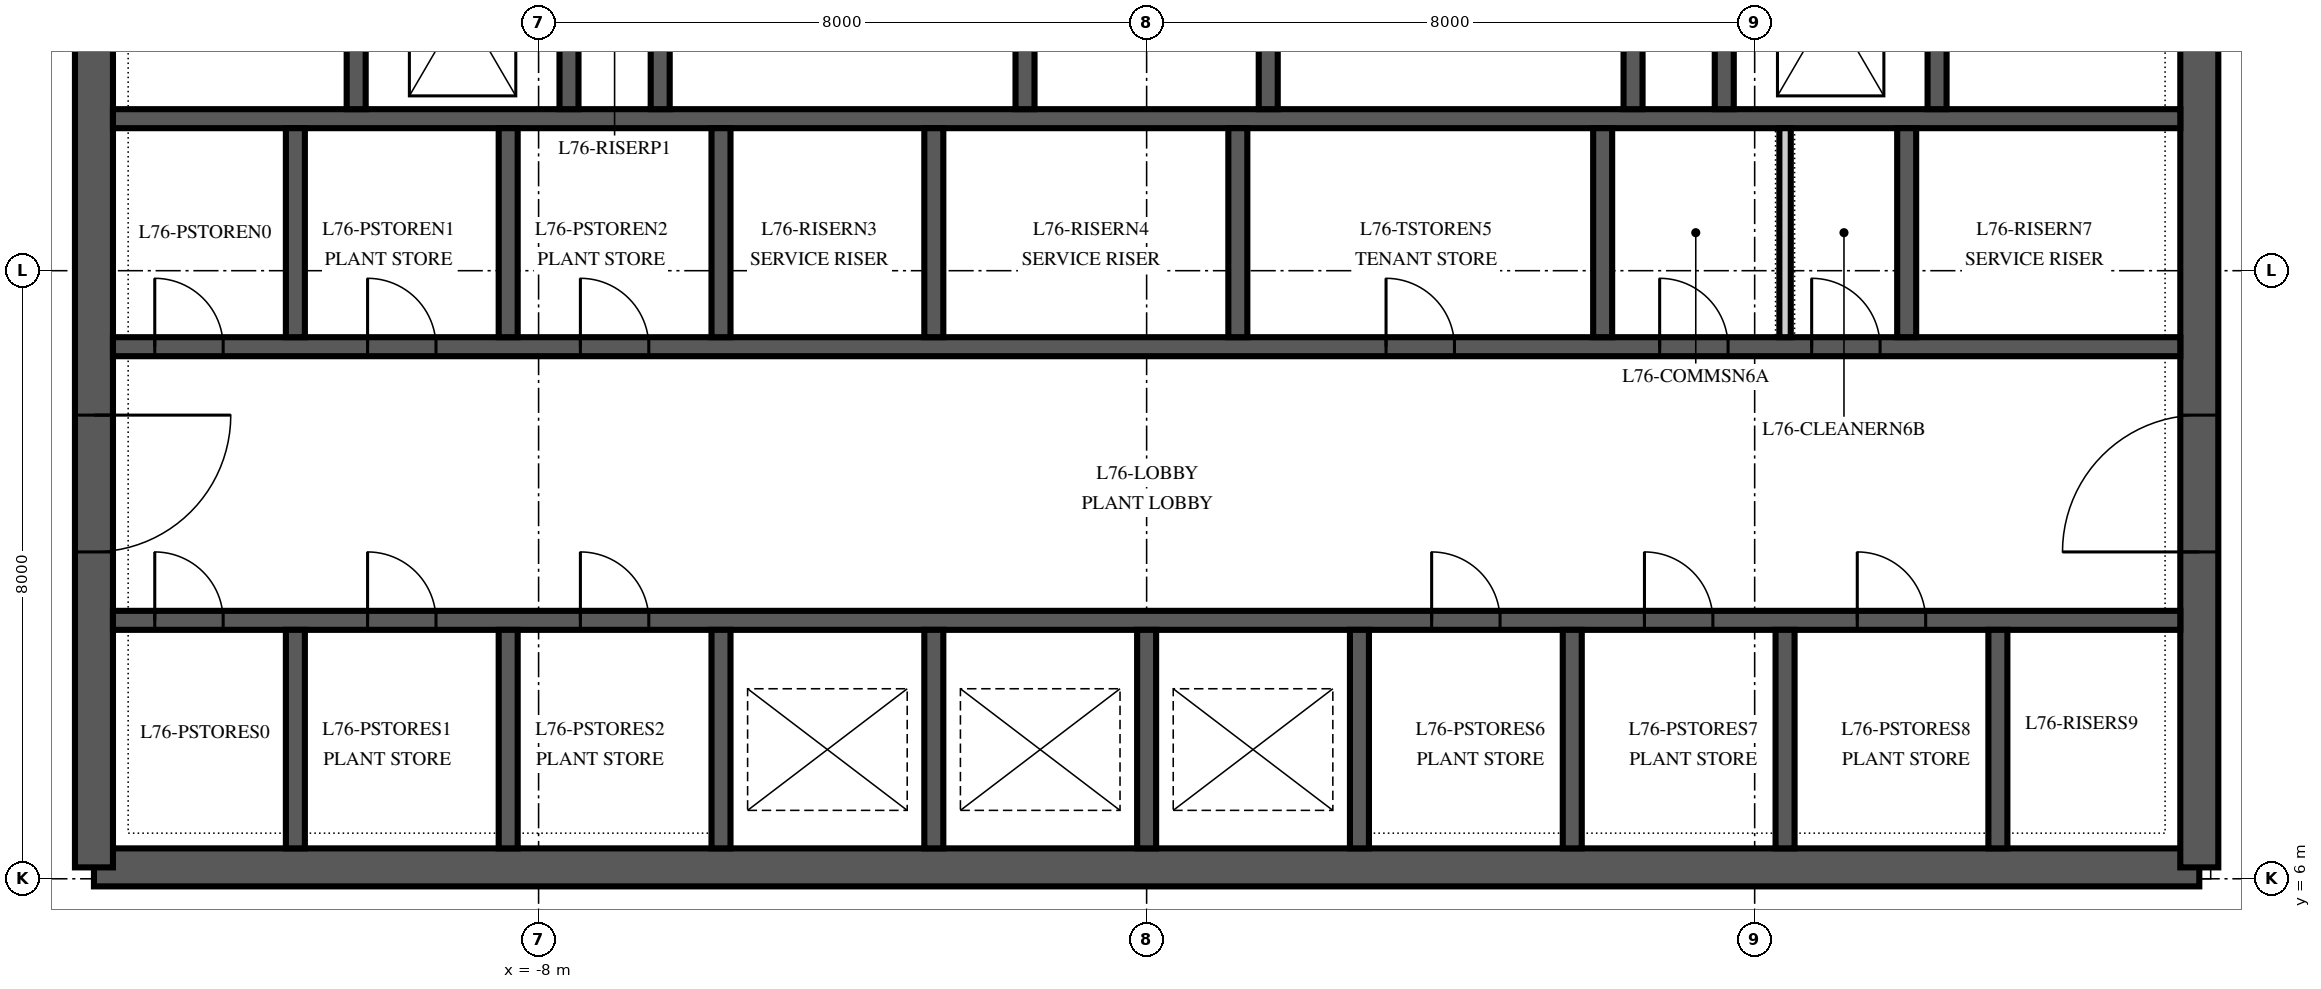
"""IFC4 building model, lengths in metres.
Left out: names, types, materials, properties, quantities, classifications, styles, units other than length and angle.
Written with IfcOpenShell. Run it as: python <this file> out.ifc"""

import sys

from ifc_helpers import new_model, si_unit, direction, frame, frame_2d, origin, place, context, subcontext, project, spatial, polyline, rectangle, outline, extrude, element, fill, save


model = new_model("IFC4")
c1 = context("Model", 3, precision=1e-05, world=origin(), true_north=direction((0.0, 1.0)))
c2 = subcontext(c1, "Body", "Model", "MODEL_VIEW")
j1 = project(units=[si_unit("LENGTHUNIT", "METRE"), si_unit("PLANEANGLEUNIT", "RADIAN")], contexts=[c1])
p1 = place(None, origin())
s1 = spatial("IfcSite", under=j1, at=p1, CompositionType="ELEMENT")
p2 = place(p1, origin())
s2 = spatial("IfcBuilding", under=s1, at=p2, CompositionType="ELEMENT")
p3 = place(p2, frame((0.0, 0.0, 324.0)))
s3 = spatial("IfcBuildingStorey", under=s2, at=p3, CompositionType="ELEMENT", Elevation=324.0)
p4 = place(p3, frame((-13.85, 6.15, 0.0), z_axis=(0.0, 0.0, 1.0), x_axis=(1.0, 0.0, 0.0)))
e1 = element("IfcWall", 1, at=p4, inside=s3, PredefinedType="SHEAR", context=c2, shape_type="SweptSolid", body=[
    extrude(rectangle(XDim=27.7, YDim=0.5, at=frame_2d((13.85, 0.0))), origin(), (0.0, 0.0, 1.0), 6.0),
])
p5 = place(p3, frame((13.85, 6.15, 0.0), z_axis=(0.0, 0.0, 1.0), x_axis=(0.0, 1.0, 0.0)))
e2 = element("IfcWall", 2, at=p5, inside=s3, PredefinedType="SHEAR", context=c2, shape_type="SweptSolid", body=[
    extrude(outline(polyline([(0.0, -0.25), (17.7, -0.25), (17.7, 0.0), (17.45, 0.0), (17.45, 0.25), (0.25, 0.25), (0.25, 0.0), (0.0, 0.0), (0.0, -0.25)])), origin(), (0.0, 0.0, 1.0), 6.0),
])
p6 = place(p5, frame((4.15, 0.0, 0.0)))
e3 = element("IfcOpeningElement", 3, at=p6, cuts=e2, PredefinedType="OPENING", context=c2, shape_type="SweptSolid", body=[
    extrude(rectangle(XDim=1.8, YDim=2.4, at=frame_2d((0.9, 1.2))), frame((0.0, 0.265, 0.0), z_axis=(0.0, -1.0, 0.0), x_axis=(1.0, 0.0, 0.0)), (0.0, 0.0, 1.0), 0.53),
])
p7 = place(p3, frame((-13.85, 23.85, 0.0), z_axis=(0.0, 0.0, 1.0), x_axis=(0.0, -1.0, 0.0)))
e4 = element("IfcWall", 4, at=p7, inside=s3, PredefinedType="SHEAR", context=c2, shape_type="SweptSolid", body=[
    extrude(outline(polyline([(0.0, -0.25), (17.7, -0.25), (17.7, 0.0), (17.45, 0.0), (17.45, 0.25), (0.25, 0.25), (0.25, 0.0), (0.0, 0.0), (0.0, -0.25)])), origin(), (0.0, 0.0, 1.0), 6.0),
])
p8 = place(p7, frame((11.75, 0.0, 0.0)))
e5 = element("IfcOpeningElement", 5, at=p8, cuts=e4, PredefinedType="OPENING", context=c2, shape_type="SweptSolid", body=[
    extrude(rectangle(XDim=1.8, YDim=2.4, at=frame_2d((0.9, 1.2))), frame((0.0, 0.265, 0.0), z_axis=(0.0, -1.0, 0.0), x_axis=(1.0, 0.0, 0.0)), (0.0, 0.0, 1.0), 0.53),
])
p9 = place(p3, frame((-13.6, 9.4, 0.0), z_axis=(0.0, 0.0, 1.0), x_axis=(1.0, 0.0, 0.0)))
e6 = element("IfcWall", 6, at=p9, inside=s3, PredefinedType="SHEAR", context=c2, shape_type="SweptSolid", body=[
    extrude(rectangle(XDim=27.2, YDim=0.25, at=frame_2d((13.6, 0.0))), origin(), (0.0, 0.0, 1.0), 6.0),
])
p10 = place(p9, frame((0.55, 0.0, 0.0)))
e7 = element("IfcOpeningElement", 7, at=p10, cuts=e6, PredefinedType="OPENING", context=c2, shape_type="SweptSolid", body=[
    extrude(rectangle(XDim=0.9, YDim=2.1, at=frame_2d((0.45, 1.05))), frame((0.0, 0.14, 0.0), z_axis=(0.0, -1.0, 0.0), x_axis=(1.0, 0.0, 0.0)), (0.0, 0.0, 1.0), 0.28),
])
p11 = place(p9, frame((3.35, 0.0, 0.0)))
e8 = element("IfcOpeningElement", 8, at=p11, cuts=e6, PredefinedType="OPENING", context=c2, shape_type="SweptSolid", body=[
    extrude(rectangle(XDim=0.9, YDim=2.1, at=frame_2d((0.45, 1.05))), frame((0.0, 0.14, 0.0), z_axis=(0.0, -1.0, 0.0), x_axis=(1.0, 0.0, 0.0)), (0.0, 0.0, 1.0), 0.28),
])
p12 = place(p9, frame((6.15, 0.0, 0.0)))
e9 = element("IfcOpeningElement", 9, at=p12, cuts=e6, PredefinedType="OPENING", context=c2, shape_type="SweptSolid", body=[
    extrude(rectangle(XDim=0.9, YDim=2.1, at=frame_2d((0.45, 1.05))), frame((0.0, 0.14, 0.0), z_axis=(0.0, -1.0, 0.0), x_axis=(1.0, 0.0, 0.0)), (0.0, 0.0, 1.0), 0.28),
])
p13 = place(p9, frame((17.35, 0.0, 0.0)))
e10 = element("IfcOpeningElement", 10, at=p13, cuts=e6, PredefinedType="OPENING", context=c2, shape_type="SweptSolid", body=[
    extrude(rectangle(XDim=0.9, YDim=2.1, at=frame_2d((0.45, 1.05))), frame((0.0, 0.14, 0.0), z_axis=(0.0, -1.0, 0.0), x_axis=(1.0, 0.0, 0.0)), (0.0, 0.0, 1.0), 0.28),
])
p14 = place(p9, frame((20.15, 0.0, 0.0)))
e11 = element("IfcOpeningElement", 11, at=p14, cuts=e6, PredefinedType="OPENING", context=c2, shape_type="SweptSolid", body=[
    extrude(rectangle(XDim=0.9, YDim=2.1, at=frame_2d((0.45, 1.05))), frame((0.0, 0.14, 0.0), z_axis=(0.0, -1.0, 0.0), x_axis=(1.0, 0.0, 0.0)), (0.0, 0.0, 1.0), 0.28),
])
p15 = place(p9, frame((22.95, 0.0, 0.0)))
e12 = element("IfcOpeningElement", 12, at=p15, cuts=e6, PredefinedType="OPENING", context=c2, shape_type="SweptSolid", body=[
    extrude(rectangle(XDim=0.9, YDim=2.1, at=frame_2d((0.45, 1.05))), frame((0.0, 0.14, 0.0), z_axis=(0.0, -1.0, 0.0), x_axis=(1.0, 0.0, 0.0)), (0.0, 0.0, 1.0), 0.28),
])
p16 = place(p3, frame((-13.6, 13.0, 0.0), z_axis=(0.0, 0.0, 1.0), x_axis=(1.0, 0.0, 0.0)))
e13 = element("IfcWall", 13, at=p16, inside=s3, PredefinedType="SHEAR", context=c2, shape_type="SweptSolid", body=[
    extrude(rectangle(XDim=27.2, YDim=0.25, at=frame_2d((13.6, 0.0))), origin(), (0.0, 0.0, 1.0), 6.0),
])
p17 = place(p16, frame((0.55, 0.0, 0.0)))
e14 = element("IfcOpeningElement", 14, at=p17, cuts=e13, PredefinedType="OPENING", context=c2, shape_type="SweptSolid", body=[
    extrude(rectangle(XDim=0.9, YDim=2.1, at=frame_2d((0.45, 1.05))), frame((0.0, 0.14, 0.0), z_axis=(0.0, -1.0, 0.0), x_axis=(1.0, 0.0, 0.0)), (0.0, 0.0, 1.0), 0.28),
])
p18 = place(p16, frame((3.35, 0.0, 0.0)))
e15 = element("IfcOpeningElement", 15, at=p18, cuts=e13, PredefinedType="OPENING", context=c2, shape_type="SweptSolid", body=[
    extrude(rectangle(XDim=0.9, YDim=2.1, at=frame_2d((0.45, 1.05))), frame((0.0, 0.14, 0.0), z_axis=(0.0, -1.0, 0.0), x_axis=(1.0, 0.0, 0.0)), (0.0, 0.0, 1.0), 0.28),
])
p19 = place(p16, frame((6.15, 0.0, 0.0)))
e16 = element("IfcOpeningElement", 16, at=p19, cuts=e13, PredefinedType="OPENING", context=c2, shape_type="SweptSolid", body=[
    extrude(rectangle(XDim=0.9, YDim=2.1, at=frame_2d((0.45, 1.05))), frame((0.0, 0.14, 0.0), z_axis=(0.0, -1.0, 0.0), x_axis=(1.0, 0.0, 0.0)), (0.0, 0.0, 1.0), 0.28),
])
p20 = place(p16, frame((16.75, 0.0, 0.0)))
e17 = element("IfcOpeningElement", 17, at=p20, cuts=e13, PredefinedType="OPENING", context=c2, shape_type="SweptSolid", body=[
    extrude(rectangle(XDim=0.9, YDim=2.1, at=frame_2d((0.45, 1.05))), frame((0.0, 0.14, 0.0), z_axis=(0.0, -1.0, 0.0), x_axis=(1.0, 0.0, 0.0)), (0.0, 0.0, 1.0), 0.28),
])
p21 = place(p16, frame((20.35, 0.0, 0.0)))
e18 = element("IfcOpeningElement", 18, at=p21, cuts=e13, PredefinedType="OPENING", context=c2, shape_type="SweptSolid", body=[
    extrude(rectangle(XDim=0.9, YDim=2.1, at=frame_2d((0.45, 1.05))), frame((0.0, 0.14, 0.0), z_axis=(0.0, -1.0, 0.0), x_axis=(1.0, 0.0, 0.0)), (0.0, 0.0, 1.0), 0.28),
])
p22 = place(p16, frame((22.35, 0.0, 0.0)))
e19 = element("IfcOpeningElement", 19, at=p22, cuts=e13, PredefinedType="OPENING", context=c2, shape_type="SweptSolid", body=[
    extrude(rectangle(XDim=0.9, YDim=2.1, at=frame_2d((0.45, 1.05))), frame((0.0, 0.14, 0.0), z_axis=(0.0, -1.0, 0.0), x_axis=(1.0, 0.0, 0.0)), (0.0, 0.0, 1.0), 0.28),
])
p23 = place(p3, frame((-13.6, 16.0, 0.0), z_axis=(0.0, 0.0, 1.0), x_axis=(1.0, 0.0, 0.0)))
e20 = element("IfcWall", 20, at=p23, inside=s3, PredefinedType="SHEAR", context=c2, shape_type="SweptSolid", body=[
    extrude(rectangle(XDim=27.2, YDim=0.25, at=frame_2d((13.6, 0.0))), origin(), (0.0, 0.0, 1.0), 6.0),
])
for number, where, z_axis, x_axis in (
    (21, (-11.2, 6.4, 0.0), (0.0, 0.0, 1.0), (0.0, 1.0, 0.0)),
    (22, (-8.4, 6.4, 0.0), (0.0, 0.0, 1.0), (0.0, 1.0, 0.0)),
    (23, (-5.6, 6.4, 0.0), (0.0, 0.0, 1.0), (0.0, 1.0, 0.0)),
    (24, (-2.8, 6.4, 0.0), (0.0, 0.0, 1.0), (0.0, 1.0, 0.0)),
    (25, (0.0, 6.4, 0.0), (0.0, 0.0, 1.0), (0.0, 1.0, 0.0)),
    (26, (2.8, 6.4, 0.0), (0.0, 0.0, 1.0), (0.0, 1.0, 0.0)),
    (27, (5.6, 6.4, 0.0), (0.0, 0.0, 1.0), (0.0, 1.0, 0.0)),
    (28, (8.4, 6.4, 0.0), (0.0, 0.0, 1.0), (0.0, 1.0, 0.0)),
    (29, (11.2, 6.4, 0.0), (0.0, 0.0, 1.0), (0.0, 1.0, 0.0)),
):
    element("IfcWall", number, at=place(p3, frame(where, z_axis=z_axis, x_axis=x_axis)), inside=s3, PredefinedType="SHEAR", context=c2, shape_type="SweptSolid", body=[
        extrude(rectangle(XDim=2.875, YDim=0.25, at=frame_2d((1.438, 0.0))), origin(), (0.0, 0.0, 1.0), 6.0),
    ])
for number, where, z_axis, x_axis in (
    (30, (-11.2, 13.125, 0.0), (0.0, 0.0, 1.0), (0.0, 1.0, 0.0)),
    (31, (-8.4, 13.125, 0.0), (0.0, 0.0, 1.0), (0.0, 1.0, 0.0)),
    (32, (-5.6, 13.125, 0.0), (0.0, 0.0, 1.0), (0.0, 1.0, 0.0)),
    (33, (-2.8, 13.125, 0.0), (0.0, 0.0, 1.0), (0.0, 1.0, 0.0)),
    (34, (1.2, 13.125, 0.0), (0.0, 0.0, 1.0), (0.0, 1.0, 0.0)),
    (35, (6.0, 13.125, 0.0), (0.0, 0.0, 1.0), (0.0, 1.0, 0.0)),
    (36, (10.0, 13.125, 0.0), (0.0, 0.0, 1.0), (0.0, 1.0, 0.0)),
):
    element("IfcWall", number, at=place(p3, frame(where, z_axis=z_axis, x_axis=x_axis)), inside=s3, PredefinedType="SHEAR", context=c2, shape_type="SweptSolid", body=[
        extrude(rectangle(XDim=2.75, YDim=0.25, at=frame_2d((1.375, 0.0))), origin(), (0.0, 0.0, 1.0), 6.0),
    ])
p24 = place(p3, frame((-10.4, 16.125, 0.0), z_axis=(0.0, 0.0, 1.0), x_axis=(0.0, 1.0, 0.0)))
e37 = element("IfcWall", 37, at=p24, inside=s3, PredefinedType="SHEAR", context=c2, shape_type="SweptSolid", body=[
    extrude(rectangle(XDim=7.475, YDim=0.25, at=frame_2d((3.738, 0.0))), origin(), (0.0, 0.0, 1.0), 6.0),
])
p25 = place(p24, frame((6.275, 0.0, 0.0)))
e38 = element("IfcOpeningElement", 38, at=p25, cuts=e37, PredefinedType="OPENING", context=c2, shape_type="SweptSolid", body=[
    extrude(rectangle(XDim=1.0, YDim=2.1, at=frame_2d((0.5, 1.05))), frame((0.0, 0.14, 0.0), z_axis=(0.0, -1.0, 0.0), x_axis=(1.0, 0.0, 0.0)), (0.0, 0.0, 1.0), 0.28),
])
for number, where, z_axis, x_axis in (
    (39, (-6.4, 16.125, 0.0), (0.0, 0.0, 1.0), (0.0, 1.0, 0.0)),
    (40, (-1.6, 16.125, 0.0), (0.0, 0.0, 1.0), (0.0, 1.0, 0.0)),
    (41, (1.6, 16.125, 0.0), (0.0, 0.0, 1.0), (0.0, 1.0, 0.0)),
    (42, (6.4, 16.125, 0.0), (0.0, 0.0, 1.0), (0.0, 1.0, 0.0)),
):
    element("IfcWall", number, at=place(p3, frame(where, z_axis=z_axis, x_axis=x_axis)), inside=s3, PredefinedType="SHEAR", context=c2, shape_type="SweptSolid", body=[
        extrude(rectangle(XDim=7.475, YDim=0.25, at=frame_2d((3.738, 0.0))), origin(), (0.0, 0.0, 1.0), 6.0),
    ])
p26 = place(p3, frame((10.4, 16.125, 0.0), z_axis=(0.0, 0.0, 1.0), x_axis=(0.0, 1.0, 0.0)))
e43 = element("IfcWall", 43, at=p26, inside=s3, PredefinedType="SHEAR", context=c2, shape_type="SweptSolid", body=[
    extrude(rectangle(XDim=7.475, YDim=0.25, at=frame_2d((3.738, 0.0))), origin(), (0.0, 0.0, 1.0), 6.0),
])
p27 = place(p26, frame((6.275, 0.0, 0.0)))
e44 = element("IfcOpeningElement", 44, at=p27, cuts=e43, PredefinedType="OPENING", context=c2, shape_type="SweptSolid", body=[
    extrude(rectangle(XDim=1.0, YDim=2.1, at=frame_2d((0.5, 1.05))), frame((0.0, 0.14, 0.0), z_axis=(0.0, -1.0, 0.0), x_axis=(1.0, 0.0, 0.0)), (0.0, 0.0, 1.0), 0.28),
])
for number, where, z_axis, x_axis in (
    (45, (-7.6, 16.125, 0.0), (0.0, 0.0, 1.0), (0.0, 1.0, 0.0)),
    (46, (7.6, 16.125, 0.0), (0.0, 0.0, 1.0), (0.0, 1.0, 0.0)),
):
    element("IfcWall", number, at=place(p3, frame(where, z_axis=z_axis, x_axis=x_axis)), inside=s3, PredefinedType="SHEAR", context=c2, shape_type="SweptSolid", body=[
        extrude(rectangle(XDim=2.75, YDim=0.25, at=frame_2d((1.375, 0.0))), origin(), (0.0, 0.0, 1.0), 6.0),
    ])
p28 = place(p3, frame((8.4, 13.125, 0.0), z_axis=(0.0, 0.0, 1.0), x_axis=(0.0, 1.0, 0.0)))
e47 = element("IfcWall", 47, at=p28, inside=s3, PredefinedType="PARTITIONING", context=c2, shape_type="SweptSolid", body=[
    extrude(rectangle(XDim=2.75, YDim=0.15, at=frame_2d((1.375, 0.0))), origin(), (0.0, 0.0, 1.0), 5.85),
])
p29 = place(p6, origin())
e48 = element("IfcDoor", 48, at=p29, inside=s3, OperationType="DOUBLE_DOOR_SINGLE_SWING", PredefinedType="DOOR", context=c2, shape_type="SweptSolid", body=[
    extrude(rectangle(XDim=1.8, YDim=2.4, at=frame_2d((0.9, 1.2))), frame((0.0, 0.25, 0.0), z_axis=(0.0, -1.0, 0.0), x_axis=(1.0, 0.0, 0.0)), (0.0, 0.0, 1.0), 0.5),
])
fill(e3, e48)
p30 = place(p8, origin())
e49 = element("IfcDoor", 49, at=p30, inside=s3, OperationType="DOUBLE_DOOR_SINGLE_SWING", PredefinedType="DOOR", context=c2, shape_type="SweptSolid", body=[
    extrude(rectangle(XDim=1.8, YDim=2.4, at=frame_2d((0.9, 1.2))), frame((0.0, 0.25, 0.0), z_axis=(0.0, -1.0, 0.0), x_axis=(1.0, 0.0, 0.0)), (0.0, 0.0, 1.0), 0.5),
])
fill(e5, e49)
p31 = place(p10, origin())
e50 = element("IfcDoor", 50, at=p31, inside=s3, OperationType="SINGLE_SWING_LEFT", PredefinedType="DOOR", context=c2, shape_type="SweptSolid", body=[
    extrude(rectangle(XDim=0.9, YDim=2.1, at=frame_2d((0.45, 1.05))), frame((0.0, 0.125, 0.0), z_axis=(0.0, -1.0, 0.0), x_axis=(1.0, 0.0, 0.0)), (0.0, 0.0, 1.0), 0.25),
])
fill(e7, e50)
p32 = place(p11, origin())
e51 = element("IfcDoor", 51, at=p32, inside=s3, OperationType="SINGLE_SWING_LEFT", PredefinedType="DOOR", context=c2, shape_type="SweptSolid", body=[
    extrude(rectangle(XDim=0.9, YDim=2.1, at=frame_2d((0.45, 1.05))), frame((0.0, 0.125, 0.0), z_axis=(0.0, -1.0, 0.0), x_axis=(1.0, 0.0, 0.0)), (0.0, 0.0, 1.0), 0.25),
])
fill(e8, e51)
p33 = place(p12, origin())
e52 = element("IfcDoor", 52, at=p33, inside=s3, OperationType="SINGLE_SWING_LEFT", PredefinedType="DOOR", context=c2, shape_type="SweptSolid", body=[
    extrude(rectangle(XDim=0.9, YDim=2.1, at=frame_2d((0.45, 1.05))), frame((0.0, 0.125, 0.0), z_axis=(0.0, -1.0, 0.0), x_axis=(1.0, 0.0, 0.0)), (0.0, 0.0, 1.0), 0.25),
])
fill(e9, e52)
p34 = place(p13, origin())
e53 = element("IfcDoor", 53, at=p34, inside=s3, OperationType="SINGLE_SWING_LEFT", PredefinedType="DOOR", context=c2, shape_type="SweptSolid", body=[
    extrude(rectangle(XDim=0.9, YDim=2.1, at=frame_2d((0.45, 1.05))), frame((0.0, 0.125, 0.0), z_axis=(0.0, -1.0, 0.0), x_axis=(1.0, 0.0, 0.0)), (0.0, 0.0, 1.0), 0.25),
])
fill(e10, e53)
p35 = place(p14, origin())
e54 = element("IfcDoor", 54, at=p35, inside=s3, OperationType="SINGLE_SWING_LEFT", PredefinedType="DOOR", context=c2, shape_type="SweptSolid", body=[
    extrude(rectangle(XDim=0.9, YDim=2.1, at=frame_2d((0.45, 1.05))), frame((0.0, 0.125, 0.0), z_axis=(0.0, -1.0, 0.0), x_axis=(1.0, 0.0, 0.0)), (0.0, 0.0, 1.0), 0.25),
])
fill(e11, e54)
p36 = place(p15, origin())
e55 = element("IfcDoor", 55, at=p36, inside=s3, OperationType="SINGLE_SWING_LEFT", PredefinedType="DOOR", context=c2, shape_type="SweptSolid", body=[
    extrude(rectangle(XDim=0.9, YDim=2.1, at=frame_2d((0.45, 1.05))), frame((0.0, 0.125, 0.0), z_axis=(0.0, -1.0, 0.0), x_axis=(1.0, 0.0, 0.0)), (0.0, 0.0, 1.0), 0.25),
])
fill(e12, e55)
p37 = place(p17, origin())
e56 = element("IfcDoor", 56, at=p37, inside=s3, OperationType="SINGLE_SWING_LEFT", PredefinedType="DOOR", context=c2, shape_type="SweptSolid", body=[
    extrude(rectangle(XDim=0.9, YDim=2.1, at=frame_2d((0.45, 1.05))), frame((0.0, 0.125, 0.0), z_axis=(0.0, -1.0, 0.0), x_axis=(1.0, 0.0, 0.0)), (0.0, 0.0, 1.0), 0.25),
])
fill(e14, e56)
p38 = place(p18, origin())
e57 = element("IfcDoor", 57, at=p38, inside=s3, OperationType="SINGLE_SWING_LEFT", PredefinedType="DOOR", context=c2, shape_type="SweptSolid", body=[
    extrude(rectangle(XDim=0.9, YDim=2.1, at=frame_2d((0.45, 1.05))), frame((0.0, 0.125, 0.0), z_axis=(0.0, -1.0, 0.0), x_axis=(1.0, 0.0, 0.0)), (0.0, 0.0, 1.0), 0.25),
])
fill(e15, e57)
p39 = place(p19, origin())
e58 = element("IfcDoor", 58, at=p39, inside=s3, OperationType="SINGLE_SWING_LEFT", PredefinedType="DOOR", context=c2, shape_type="SweptSolid", body=[
    extrude(rectangle(XDim=0.9, YDim=2.1, at=frame_2d((0.45, 1.05))), frame((0.0, 0.125, 0.0), z_axis=(0.0, -1.0, 0.0), x_axis=(1.0, 0.0, 0.0)), (0.0, 0.0, 1.0), 0.25),
])
fill(e16, e58)
p40 = place(p20, origin())
e59 = element("IfcDoor", 59, at=p40, inside=s3, OperationType="SINGLE_SWING_LEFT", PredefinedType="DOOR", context=c2, shape_type="SweptSolid", body=[
    extrude(rectangle(XDim=0.9, YDim=2.1, at=frame_2d((0.45, 1.05))), frame((0.0, 0.125, 0.0), z_axis=(0.0, -1.0, 0.0), x_axis=(1.0, 0.0, 0.0)), (0.0, 0.0, 1.0), 0.25),
])
fill(e17, e59)
p41 = place(p21, origin())
e60 = element("IfcDoor", 60, at=p41, inside=s3, OperationType="SINGLE_SWING_LEFT", PredefinedType="DOOR", context=c2, shape_type="SweptSolid", body=[
    extrude(rectangle(XDim=0.9, YDim=2.1, at=frame_2d((0.45, 1.05))), frame((0.0, 0.125, 0.0), z_axis=(0.0, -1.0, 0.0), x_axis=(1.0, 0.0, 0.0)), (0.0, 0.0, 1.0), 0.25),
])
fill(e18, e60)
p42 = place(p22, origin())
e61 = element("IfcDoor", 61, at=p42, inside=s3, OperationType="SINGLE_SWING_LEFT", PredefinedType="DOOR", context=c2, shape_type="SweptSolid", body=[
    extrude(rectangle(XDim=0.9, YDim=2.1, at=frame_2d((0.45, 1.05))), frame((0.0, 0.125, 0.0), z_axis=(0.0, -1.0, 0.0), x_axis=(1.0, 0.0, 0.0)), (0.0, 0.0, 1.0), 0.25),
])
fill(e19, e61)
save(model, sys.argv[1])
